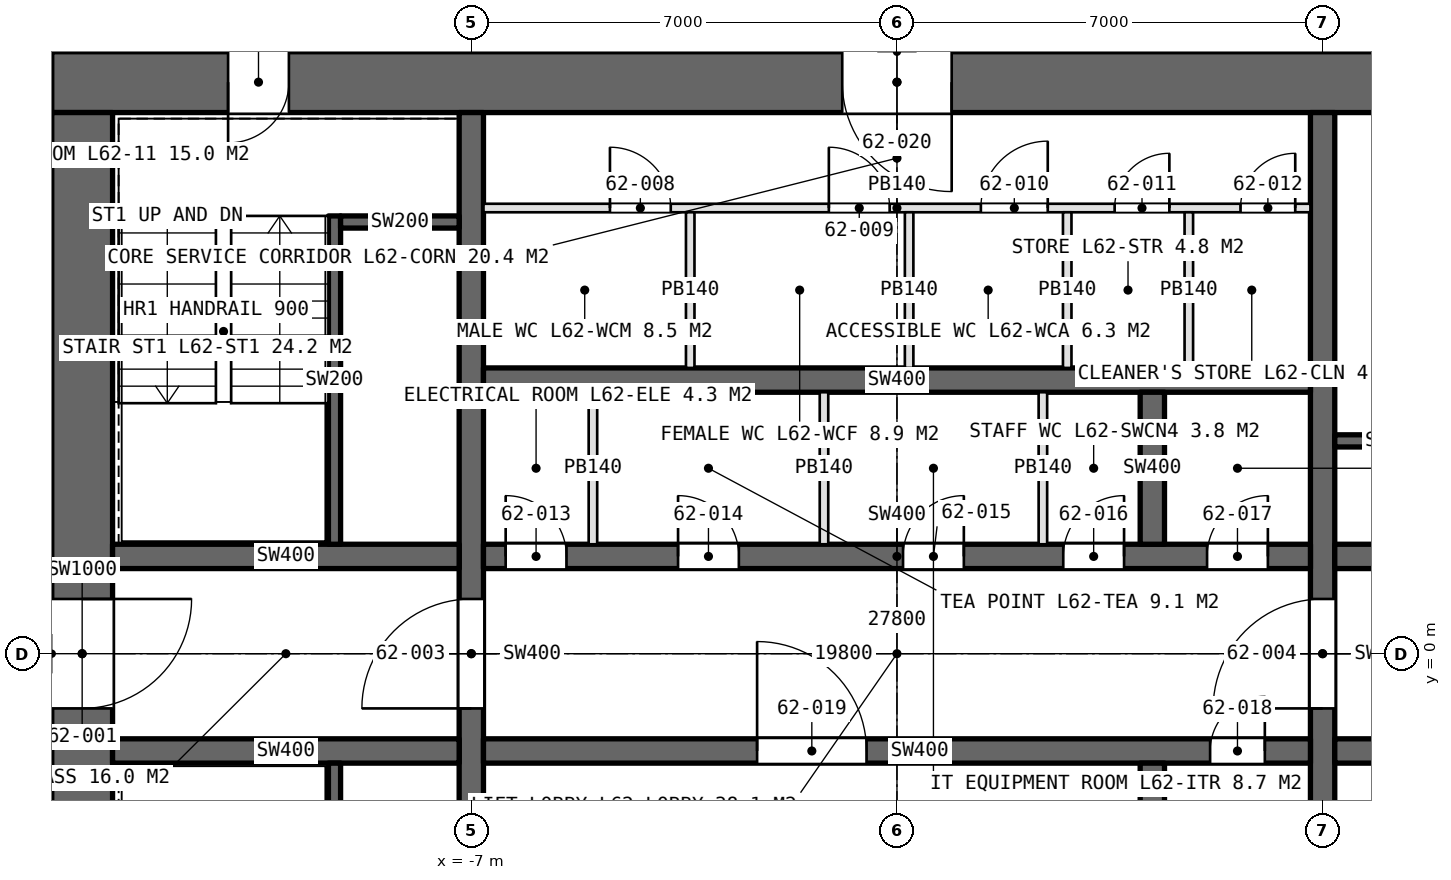
"""IFC4 building model, lengths in metres.
Left out: names, types, materials, properties, quantities, classifications, styles, units other than length and angle.
Written with IfcOpenShell. Run it as: python <this file> out.ifc"""

import sys

from ifc_helpers import new_model, si_unit, direction, frame, frame_2d, origin, place, context, subcontext, project, spatial, rectangle, extrude, element, fill, save


model = new_model("IFC4")
c1 = context("Model", 3, precision=1e-05, world=origin(), true_north=direction((0.0, 1.0)))
c2 = subcontext(c1, "Body", "Model", "MODEL_VIEW")
j1 = project(units=[si_unit("LENGTHUNIT", "METRE"), si_unit("PLANEANGLEUNIT", "RADIAN")], contexts=[c1])
p1 = place(None, origin())
s1 = spatial("IfcSite", under=j1, at=p1, CompositionType="ELEMENT")
p2 = place(p1, origin())
s2 = spatial("IfcBuilding", under=s1, at=p2, CompositionType="ELEMENT")
p3 = place(p2, frame((0.0, 0.0, 279.6)))
s3 = spatial("IfcBuildingStorey", under=s2, at=p3, CompositionType="ELEMENT", Elevation=279.6)
p4 = place(p3, frame((13.9, 9.4, 0.0), z_axis=(0.0, 0.0, 1.0), x_axis=(-1.0, 0.0, 0.0)))
e1 = element("IfcWall", 1, at=p4, inside=s3, PredefinedType="SHEAR", context=c2, shape_type="SweptSolid", body=[
    extrude(rectangle(XDim=27.8, YDim=1.0, at=frame_2d((13.9, 0.0))), origin(), (0.0, 0.0, 1.0), 4.2),
])
p5 = place(p4, frame((23.9, 0.0, 0.0)))
e2 = element("IfcOpeningElement", 2, at=p5, cuts=e1, PredefinedType="OPENING", context=c2, shape_type="SweptSolid", body=[
    extrude(rectangle(XDim=1.0, YDim=2.4, at=frame_2d((0.5, 1.2))), frame((0.0, 0.51, 0.0), z_axis=(0.0, -1.0, 0.0), x_axis=(1.0, 0.0, 0.0)), (0.0, 0.0, 1.0), 1.02),
])
p6 = place(p4, frame((13.0, 0.0, 0.0)))
e3 = element("IfcOpeningElement", 3, at=p6, cuts=e1, PredefinedType="OPENING", context=c2, shape_type="SweptSolid", body=[
    extrude(rectangle(XDim=1.8, YDim=2.4, at=frame_2d((0.9, 1.2))), frame((0.0, 0.51, 0.0), z_axis=(0.0, -1.0, 0.0), x_axis=(1.0, 0.0, 0.0)), (0.0, 0.0, 1.0), 1.02),
])
p7 = place(p3, frame((-13.4, 8.9, 0.0), z_axis=(0.0, 0.0, 1.0), x_axis=(0.0, -1.0, 0.0)))
e4 = element("IfcWall", 4, at=p7, inside=s3, PredefinedType="SHEAR", context=c2, shape_type="SweptSolid", body=[
    extrude(rectangle(XDim=17.8, YDim=1.0, at=frame_2d((8.9, 0.0))), origin(), (0.0, 0.0, 1.0), 4.2),
])
p8 = place(p7, frame((8.0, 0.0, 0.0)))
e5 = element("IfcOpeningElement", 5, at=p8, cuts=e4, PredefinedType="OPENING", context=c2, shape_type="SweptSolid", body=[
    extrude(rectangle(XDim=1.8, YDim=2.4, at=frame_2d((0.9, 1.2))), frame((0.0, 0.51, 0.0), z_axis=(0.0, -1.0, 0.0), x_axis=(1.0, 0.0, 0.0)), (0.0, 0.0, 1.0), 1.02),
])
p9 = place(p7, frame((16.6, 0.0, 0.0)))
e6 = element("IfcOpeningElement", 6, at=p9, cuts=e4, PredefinedType="OPENING", context=c2, shape_type="SweptSolid", body=[
    extrude(rectangle(XDim=1.0, YDim=2.4, at=frame_2d((0.5, 1.2))), frame((0.0, 0.51, 0.0), z_axis=(0.0, -1.0, 0.0), x_axis=(1.0, 0.0, 0.0)), (0.0, 0.0, 1.0), 1.02),
])
p10 = place(p3, frame((-7.0, -8.9, 0.0), z_axis=(0.0, 0.0, 1.0), x_axis=(0.0, 1.0, 0.0)))
e7 = element("IfcWall", 7, at=p10, inside=s3, PredefinedType="SHEAR", context=c2, shape_type="SweptSolid", body=[
    extrude(rectangle(XDim=17.8, YDim=0.4, at=frame_2d((8.9, 0.0))), origin(), (0.0, 0.0, 1.0), 4.2),
])
p11 = place(p10, frame((8.0, 0.0, 0.0)))
e8 = element("IfcOpeningElement", 8, at=p11, cuts=e7, PredefinedType="OPENING", context=c2, shape_type="SweptSolid", body=[
    extrude(rectangle(XDim=1.8, YDim=2.4, at=frame_2d((0.9, 1.2))), frame((0.0, 0.21, 0.0), z_axis=(0.0, -1.0, 0.0), x_axis=(1.0, 0.0, 0.0)), (0.0, 0.0, 1.0), 0.42),
])
p12 = place(p3, frame((7.0, -8.9, 0.0), z_axis=(0.0, 0.0, 1.0), x_axis=(0.0, 1.0, 0.0)))
e9 = element("IfcWall", 9, at=p12, inside=s3, PredefinedType="SHEAR", context=c2, shape_type="SweptSolid", body=[
    extrude(rectangle(XDim=17.8, YDim=0.4, at=frame_2d((8.9, 0.0))), origin(), (0.0, 0.0, 1.0), 4.2),
])
p13 = place(p12, frame((8.0, 0.0, 0.0)))
e10 = element("IfcOpeningElement", 10, at=p13, cuts=e9, PredefinedType="OPENING", context=c2, shape_type="SweptSolid", body=[
    extrude(rectangle(XDim=1.8, YDim=2.4, at=frame_2d((0.9, 1.2))), frame((0.0, 0.21, 0.0), z_axis=(0.0, -1.0, 0.0), x_axis=(1.0, 0.0, 0.0)), (0.0, 0.0, 1.0), 0.42),
])
p14 = place(p3, frame((-6.8, 1.6, 0.0), z_axis=(0.0, 0.0, 1.0), x_axis=(1.0, 0.0, 0.0)))
e11 = element("IfcWall", 11, at=p14, inside=s3, PredefinedType="SHEAR", context=c2, shape_type="SweptSolid", body=[
    extrude(rectangle(XDim=13.6, YDim=0.4, at=frame_2d((6.8, 0.0))), origin(), (0.0, 0.0, 1.0), 4.2),
])
p15 = place(p14, frame((0.365, 0.0, 0.0)))
e12 = element("IfcOpeningElement", 12, at=p15, cuts=e11, PredefinedType="OPENING", context=c2, shape_type="SweptSolid", body=[
    extrude(rectangle(XDim=1.0, YDim=2.4, at=frame_2d((0.5, 1.2))), frame((0.0, 0.21, 0.0), z_axis=(0.0, -1.0, 0.0), x_axis=(1.0, 0.0, 0.0)), (0.0, 0.0, 1.0), 0.42),
])
p16 = place(p14, frame((3.2, 0.0, 0.0)))
e13 = element("IfcOpeningElement", 13, at=p16, cuts=e11, PredefinedType="OPENING", context=c2, shape_type="SweptSolid", body=[
    extrude(rectangle(XDim=1.0, YDim=2.4, at=frame_2d((0.5, 1.2))), frame((0.0, 0.21, 0.0), z_axis=(0.0, -1.0, 0.0), x_axis=(1.0, 0.0, 0.0)), (0.0, 0.0, 1.0), 0.42),
])
p17 = place(p14, frame((6.9, 0.0, 0.0)))
e14 = element("IfcOpeningElement", 14, at=p17, cuts=e11, PredefinedType="OPENING", context=c2, shape_type="SweptSolid", body=[
    extrude(rectangle(XDim=1.0, YDim=2.4, at=frame_2d((0.5, 1.2))), frame((0.0, 0.21, 0.0), z_axis=(0.0, -1.0, 0.0), x_axis=(1.0, 0.0, 0.0)), (0.0, 0.0, 1.0), 0.42),
])
p18 = place(p14, frame((9.535, 0.0, 0.0)))
e15 = element("IfcOpeningElement", 15, at=p18, cuts=e11, PredefinedType="OPENING", context=c2, shape_type="SweptSolid", body=[
    extrude(rectangle(XDim=1.0, YDim=2.4, at=frame_2d((0.5, 1.2))), frame((0.0, 0.21, 0.0), z_axis=(0.0, -1.0, 0.0), x_axis=(1.0, 0.0, 0.0)), (0.0, 0.0, 1.0), 0.42),
])
p19 = place(p14, frame((11.9, 0.0, 0.0)))
e16 = element("IfcOpeningElement", 16, at=p19, cuts=e11, PredefinedType="OPENING", context=c2, shape_type="SweptSolid", body=[
    extrude(rectangle(XDim=1.0, YDim=2.4, at=frame_2d((0.5, 1.2))), frame((0.0, 0.21, 0.0), z_axis=(0.0, -1.0, 0.0), x_axis=(1.0, 0.0, 0.0)), (0.0, 0.0, 1.0), 0.42),
])
p20 = place(p3, frame((-6.8, -1.6, 0.0), z_axis=(0.0, 0.0, 1.0), x_axis=(1.0, 0.0, 0.0)))
e17 = element("IfcWall", 17, at=p20, inside=s3, PredefinedType="SHEAR", context=c2, shape_type="SweptSolid", body=[
    extrude(rectangle(XDim=13.6, YDim=0.4, at=frame_2d((6.8, 0.0))), origin(), (0.0, 0.0, 1.0), 4.2),
])
p21 = place(p20, frame((11.95, 0.0, 0.0)))
e18 = element("IfcOpeningElement", 18, at=p21, cuts=e17, PredefinedType="OPENING", context=c2, shape_type="SweptSolid", body=[
    extrude(rectangle(XDim=0.9, YDim=2.4, at=frame_2d((0.45, 1.2))), frame((0.0, 0.21, 0.0), z_axis=(0.0, -1.0, 0.0), x_axis=(1.0, 0.0, 0.0)), (0.0, 0.0, 1.0), 0.42),
])
p22 = place(p20, frame((4.5, 0.0, 0.0)))
e19 = element("IfcOpeningElement", 19, at=p22, cuts=e17, PredefinedType="OPENING", context=c2, shape_type="SweptSolid", body=[
    extrude(rectangle(XDim=1.8, YDim=2.4, at=frame_2d((0.9, 1.2))), frame((0.0, 0.21, 0.0), z_axis=(0.0, -1.0, 0.0), x_axis=(1.0, 0.0, 0.0)), (0.0, 0.0, 1.0), 0.42),
])
p23 = place(p3, frame((-6.8, 4.5, 0.0), z_axis=(0.0, 0.0, 1.0), x_axis=(1.0, 0.0, 0.0)))
e20 = element("IfcWall", 20, at=p23, inside=s3, PredefinedType="SHEAR", context=c2, shape_type="SweptSolid", body=[
    extrude(rectangle(XDim=13.6, YDim=0.4, at=frame_2d((6.8, 0.0))), origin(), (0.0, 0.0, 1.0), 4.2),
])
for number, where, z_axis, x_axis in (
    (21, (-12.9, 1.6, 0.0), (0.0, 0.0, 1.0), (1.0, 0.0, 0.0)),
    (22, (-12.9, -1.6, 0.0), (0.0, 0.0, 1.0), (1.0, 0.0, 0.0)),
):
    element("IfcWall", number, at=place(p3, frame(where, z_axis=z_axis, x_axis=x_axis)), inside=s3, PredefinedType="SHEAR", context=c2, shape_type="SweptSolid", body=[
        extrude(rectangle(XDim=5.7, YDim=0.4, at=frame_2d((2.85, 0.0))), origin(), (0.0, 0.0, 1.0), 4.2),
    ])
p24 = place(p3, frame((7.2, 1.6, 0.0), z_axis=(0.0, 0.0, 1.0), x_axis=(1.0, 0.0, 0.0)))
e23 = element("IfcWall", 23, at=p24, inside=s3, PredefinedType="SHEAR", context=c2, shape_type="SweptSolid", body=[
    extrude(rectangle(XDim=5.7, YDim=0.4, at=frame_2d((2.85, 0.0))), origin(), (0.0, 0.0, 1.0), 4.2),
])
p25 = place(p24, frame((0.7, 0.0, 0.0)))
e24 = element("IfcOpeningElement", 24, at=p25, cuts=e23, PredefinedType="OPENING", context=c2, shape_type="SweptSolid", body=[
    extrude(rectangle(XDim=1.0, YDim=2.4, at=frame_2d((0.5, 1.2))), frame((0.0, 0.21, 0.0), z_axis=(0.0, -1.0, 0.0), x_axis=(1.0, 0.0, 0.0)), (0.0, 0.0, 1.0), 0.42),
])
p26 = place(p3, frame((7.2, -1.6, 0.0), z_axis=(0.0, 0.0, 1.0), x_axis=(1.0, 0.0, 0.0)))
e25 = element("IfcWall", 25, at=p26, inside=s3, PredefinedType="SHEAR", context=c2, shape_type="SweptSolid", body=[
    extrude(rectangle(XDim=5.7, YDim=0.4, at=frame_2d((2.85, 0.0))), origin(), (0.0, 0.0, 1.0), 4.2),
])
p27 = place(p26, frame((0.9, 0.0, 0.0)))
e26 = element("IfcOpeningElement", 26, at=p27, cuts=e25, PredefinedType="OPENING", context=c2, shape_type="SweptSolid", body=[
    extrude(rectangle(XDim=1.3, YDim=2.4, at=frame_2d((0.65, 1.2))), frame((0.0, 0.21, 0.0), z_axis=(0.0, -1.0, 0.0), x_axis=(1.0, 0.0, 0.0)), (0.0, 0.0, 1.0), 0.42),
])
p28 = place(p26, frame((3.95, 0.0, 0.0)))
e27 = element("IfcOpeningElement", 27, at=p28, cuts=e25, PredefinedType="OPENING", context=c2, shape_type="SweptSolid", body=[
    extrude(rectangle(XDim=1.3, YDim=2.4, at=frame_2d((0.65, 1.2))), frame((0.0, 0.21, 0.0), z_axis=(0.0, -1.0, 0.0), x_axis=(1.0, 0.0, 0.0)), (0.0, 0.0, 1.0), 0.42),
])
for number, where, z_axis, x_axis in (
    (28, (4.2, 1.8, 0.0), (0.0, 0.0, 1.0), (0.0, 1.0, 0.0)),
    (29, (4.2, -4.3, 0.0), (0.0, 0.0, 1.0), (0.0, 1.0, 0.0)),
):
    element("IfcWall", number, at=place(p3, frame(where, z_axis=z_axis, x_axis=x_axis)), inside=s3, PredefinedType="SHEAR", context=c2, shape_type="SweptSolid", body=[
        extrude(rectangle(XDim=2.5, YDim=0.4, at=frame_2d((1.25, 0.0))), origin(), (0.0, 0.0, 1.0), 4.2),
    ])
p29 = place(p3, frame((-6.8, 7.33, 0.0), z_axis=(0.0, 0.0, 1.0), x_axis=(1.0, 0.0, 0.0)))
e30 = element("IfcWall", 30, at=p29, inside=s3, PredefinedType="PARTITIONING", context=c2, shape_type="SweptSolid", body=[
    extrude(rectangle(XDim=13.6, YDim=0.14, at=frame_2d((6.8, 0.0))), origin(), (0.0, 0.0, 1.0), 3.95),
])
p30 = place(p29, frame((2.08, 0.0, 0.0)))
e31 = element("IfcOpeningElement", 31, at=p30, cuts=e30, PredefinedType="OPENING", context=c2, shape_type="SweptSolid", body=[
    extrude(rectangle(XDim=1.0, YDim=2.4, at=frame_2d((0.5, 1.2))), frame((0.0, 0.08, 0.0), z_axis=(0.0, -1.0, 0.0), x_axis=(1.0, 0.0, 0.0)), (0.0, 0.0, 1.0), 0.16),
])
p31 = place(p29, frame((5.68, 0.0, 0.0)))
e32 = element("IfcOpeningElement", 32, at=p31, cuts=e30, PredefinedType="OPENING", context=c2, shape_type="SweptSolid", body=[
    extrude(rectangle(XDim=1.0, YDim=2.4, at=frame_2d((0.5, 1.2))), frame((0.0, 0.08, 0.0), z_axis=(0.0, -1.0, 0.0), x_axis=(1.0, 0.0, 0.0)), (0.0, 0.0, 1.0), 0.16),
])
p32 = place(p29, frame((8.18, 0.0, 0.0)))
e33 = element("IfcOpeningElement", 33, at=p32, cuts=e30, PredefinedType="OPENING", context=c2, shape_type="SweptSolid", body=[
    extrude(rectangle(XDim=1.1, YDim=2.4, at=frame_2d((0.55, 1.2))), frame((0.0, 0.08, 0.0), z_axis=(0.0, -1.0, 0.0), x_axis=(1.0, 0.0, 0.0)), (0.0, 0.0, 1.0), 0.16),
])
p33 = place(p29, frame((10.38, 0.0, 0.0)))
e34 = element("IfcOpeningElement", 34, at=p33, cuts=e30, PredefinedType="OPENING", context=c2, shape_type="SweptSolid", body=[
    extrude(rectangle(XDim=0.9, YDim=2.4, at=frame_2d((0.45, 1.2))), frame((0.0, 0.08, 0.0), z_axis=(0.0, -1.0, 0.0), x_axis=(1.0, 0.0, 0.0)), (0.0, 0.0, 1.0), 0.16),
])
p34 = place(p29, frame((12.45, 0.0, 0.0)))
e35 = element("IfcOpeningElement", 35, at=p34, cuts=e30, PredefinedType="OPENING", context=c2, shape_type="SweptSolid", body=[
    extrude(rectangle(XDim=0.9, YDim=2.4, at=frame_2d((0.45, 1.2))), frame((0.0, 0.08, 0.0), z_axis=(0.0, -1.0, 0.0), x_axis=(1.0, 0.0, 0.0)), (0.0, 0.0, 1.0), 0.16),
])
for number, where, z_axis, x_axis in (
    (36, (-3.4, 4.7, 0.0), (0.0, 0.0, 1.0), (0.0, 1.0, 0.0)),
    (37, (0.2, 4.7, 0.0), (0.0, 0.0, 1.0), (0.0, 1.0, 0.0)),
    (38, (2.8, 4.7, 0.0), (0.0, 0.0, 1.0), (0.0, 1.0, 0.0)),
    (39, (4.8, 4.7, 0.0), (0.0, 0.0, 1.0), (0.0, 1.0, 0.0)),
):
    element("IfcWall", number, at=place(p3, frame(where, z_axis=z_axis, x_axis=x_axis)), inside=s3, PredefinedType="PARTITIONING", context=c2, shape_type="SweptSolid", body=[
        extrude(rectangle(XDim=2.56, YDim=0.14, at=frame_2d((1.28, 0.0))), origin(), (0.0, 0.0, 1.0), 3.95),
    ])
for number, where, z_axis, x_axis in (
    (40, (-5.0, 1.8, 0.0), (0.0, 0.0, 1.0), (0.0, 1.0, 0.0)),
    (41, (-1.2, 1.8, 0.0), (0.0, 0.0, 1.0), (0.0, 1.0, 0.0)),
    (42, (2.4, 1.8, 0.0), (0.0, 0.0, 1.0), (0.0, 1.0, 0.0)),
):
    element("IfcWall", number, at=place(p3, frame(where, z_axis=z_axis, x_axis=x_axis)), inside=s3, PredefinedType="PARTITIONING", context=c2, shape_type="SweptSolid", body=[
        extrude(rectangle(XDim=2.5, YDim=0.14, at=frame_2d((1.25, 0.0))), origin(), (0.0, 0.0, 1.0), 3.95),
    ])
p35 = place(p3, frame((-9.25, 7.2, 0.0), z_axis=(0.0, 0.0, 1.0), x_axis=(0.0, -1.0, 0.0)))
e43 = element("IfcWall", 43, at=p35, inside=s3, PredefinedType="SOLIDWALL", context=c2, shape_type="SweptSolid", body=[
    extrude(rectangle(XDim=5.4, YDim=0.2, at=frame_2d((2.7, 0.0))), origin(), (0.0, 0.0, 1.0), 4.2),
])
p36 = place(p3, frame((-9.15, 7.1, 0.0), z_axis=(0.0, 0.0, 1.0), x_axis=(1.0, 0.0, 0.0)))
e44 = element("IfcWall", 44, at=p36, inside=s3, PredefinedType="SOLIDWALL", context=c2, shape_type="SweptSolid", body=[
    extrude(rectangle(XDim=1.95, YDim=0.2, at=frame_2d((0.975, 0.0))), origin(), (0.0, 0.0, 1.0), 4.2),
])
p37 = place(p3, frame((-9.25, -7.2, 0.0), z_axis=(0.0, 0.0, 1.0), x_axis=(0.0, 1.0, 0.0)))
e45 = element("IfcWall", 45, at=p37, inside=s3, PredefinedType="SOLIDWALL", context=c2, shape_type="SweptSolid", body=[
    extrude(rectangle(XDim=5.4, YDim=0.2, at=frame_2d((2.7, 0.0))), origin(), (0.0, 0.0, 1.0), 4.2),
])
p38 = place(p3, frame((9.15, 3.5, 0.0), z_axis=(0.0, 0.0, 1.0), x_axis=(-1.0, 0.0, 0.0)))
e46 = element("IfcWall", 46, at=p38, inside=s3, PredefinedType="SOLIDWALL", context=c2, shape_type="SweptSolid", body=[
    extrude(rectangle(XDim=1.95, YDim=0.2, at=frame_2d((0.975, 0.0))), origin(), (0.0, 0.0, 1.0), 4.2),
])
p39 = place(p8, origin())
e47 = element("IfcDoor", 47, at=p39, inside=s3, OperationType="DOUBLE_DOOR_SINGLE_SWING", PredefinedType="DOOR", context=c2, shape_type="SweptSolid", body=[
    extrude(rectangle(XDim=1.8, YDim=2.4, at=frame_2d((0.9, 1.2))), frame((0.0, 0.025, 0.0), z_axis=(0.0, -1.0, 0.0), x_axis=(1.0, 0.0, 0.0)), (0.0, 0.0, 1.0), 0.05),
])
fill(e5, e47)
p40 = place(p11, origin())
e48 = element("IfcDoor", 48, at=p40, inside=s3, OperationType="DOUBLE_DOOR_SINGLE_SWING", PredefinedType="DOOR", context=c2, shape_type="SweptSolid", body=[
    extrude(rectangle(XDim=1.8, YDim=2.4, at=frame_2d((0.9, 1.2))), frame((0.0, 0.025, 0.0), z_axis=(0.0, -1.0, 0.0), x_axis=(1.0, 0.0, 0.0)), (0.0, 0.0, 1.0), 0.05),
])
fill(e8, e48)
p41 = place(p13, origin())
e49 = element("IfcDoor", 49, at=p41, inside=s3, OperationType="DOUBLE_DOOR_SINGLE_SWING", PredefinedType="DOOR", context=c2, shape_type="SweptSolid", body=[
    extrude(rectangle(XDim=1.8, YDim=2.4, at=frame_2d((0.9, 1.2))), frame((0.0, 0.025, 0.0), z_axis=(0.0, -1.0, 0.0), x_axis=(1.0, 0.0, 0.0)), (0.0, 0.0, 1.0), 0.05),
])
fill(e10, e49)
p42 = place(p5, origin())
e50 = element("IfcDoor", 50, at=p42, inside=s3, OperationType="SINGLE_SWING_RIGHT", PredefinedType="DOOR", context=c2, shape_type="SweptSolid", body=[
    extrude(rectangle(XDim=1.0, YDim=2.4, at=frame_2d((0.5, 1.2))), frame((0.0, 0.025, 0.0), z_axis=(0.0, -1.0, 0.0), x_axis=(1.0, 0.0, 0.0)), (0.0, 0.0, 1.0), 0.05),
])
fill(e2, e50)
p43 = place(p30, origin())
e51 = element("IfcDoor", 51, at=p43, inside=s3, OperationType="SINGLE_SWING_LEFT", PredefinedType="DOOR", context=c2, shape_type="SweptSolid", body=[
    extrude(rectangle(XDim=1.0, YDim=2.4, at=frame_2d((0.5, 1.2))), frame((0.0, 0.025, 0.0), z_axis=(0.0, -1.0, 0.0), x_axis=(1.0, 0.0, 0.0)), (0.0, 0.0, 1.0), 0.05),
])
fill(e31, e51)
p44 = place(p31, origin())
e52 = element("IfcDoor", 52, at=p44, inside=s3, OperationType="SINGLE_SWING_LEFT", PredefinedType="DOOR", context=c2, shape_type="SweptSolid", body=[
    extrude(rectangle(XDim=1.0, YDim=2.4, at=frame_2d((0.5, 1.2))), frame((0.0, 0.025, 0.0), z_axis=(0.0, -1.0, 0.0), x_axis=(1.0, 0.0, 0.0)), (0.0, 0.0, 1.0), 0.05),
])
fill(e32, e52)
p45 = place(p32, origin())
e53 = element("IfcDoor", 53, at=p45, inside=s3, OperationType="SINGLE_SWING_RIGHT", PredefinedType="DOOR", context=c2, shape_type="SweptSolid", body=[
    extrude(rectangle(XDim=1.1, YDim=2.4, at=frame_2d((0.55, 1.2))), frame((0.0, 0.025, 0.0), z_axis=(0.0, -1.0, 0.0), x_axis=(1.0, 0.0, 0.0)), (0.0, 0.0, 1.0), 0.05),
])
fill(e33, e53)
p46 = place(p33, origin())
e54 = element("IfcDoor", 54, at=p46, inside=s3, OperationType="SINGLE_SWING_RIGHT", PredefinedType="DOOR", context=c2, shape_type="SweptSolid", body=[
    extrude(rectangle(XDim=0.9, YDim=2.4, at=frame_2d((0.45, 1.2))), frame((0.0, 0.025, 0.0), z_axis=(0.0, -1.0, 0.0), x_axis=(1.0, 0.0, 0.0)), (0.0, 0.0, 1.0), 0.05),
])
fill(e34, e54)
p47 = place(p34, origin())
e55 = element("IfcDoor", 55, at=p47, inside=s3, OperationType="SINGLE_SWING_RIGHT", PredefinedType="DOOR", context=c2, shape_type="SweptSolid", body=[
    extrude(rectangle(XDim=0.9, YDim=2.4, at=frame_2d((0.45, 1.2))), frame((0.0, 0.025, 0.0), z_axis=(0.0, -1.0, 0.0), x_axis=(1.0, 0.0, 0.0)), (0.0, 0.0, 1.0), 0.05),
])
fill(e35, e55)
p48 = place(p15, origin())
e56 = element("IfcDoor", 56, at=p48, inside=s3, OperationType="SINGLE_SWING_LEFT", PredefinedType="DOOR", context=c2, shape_type="SweptSolid", body=[
    extrude(rectangle(XDim=1.0, YDim=2.4, at=frame_2d((0.5, 1.2))), frame((0.0, 0.025, 0.0), z_axis=(0.0, -1.0, 0.0), x_axis=(1.0, 0.0, 0.0)), (0.0, 0.0, 1.0), 0.05),
])
fill(e12, e56)
p49 = place(p16, origin())
e57 = element("IfcDoor", 57, at=p49, inside=s3, OperationType="SINGLE_SWING_LEFT", PredefinedType="DOOR", context=c2, shape_type="SweptSolid", body=[
    extrude(rectangle(XDim=1.0, YDim=2.4, at=frame_2d((0.5, 1.2))), frame((0.0, 0.025, 0.0), z_axis=(0.0, -1.0, 0.0), x_axis=(1.0, 0.0, 0.0)), (0.0, 0.0, 1.0), 0.05),
])
fill(e13, e57)
p50 = place(p17, origin())
e58 = element("IfcDoor", 58, at=p50, inside=s3, OperationType="SINGLE_SWING_RIGHT", PredefinedType="DOOR", context=c2, shape_type="SweptSolid", body=[
    extrude(rectangle(XDim=1.0, YDim=2.4, at=frame_2d((0.5, 1.2))), frame((0.0, 0.025, 0.0), z_axis=(0.0, -1.0, 0.0), x_axis=(1.0, 0.0, 0.0)), (0.0, 0.0, 1.0), 0.05),
])
fill(e14, e58)
p51 = place(p18, origin())
e59 = element("IfcDoor", 59, at=p51, inside=s3, OperationType="SINGLE_SWING_RIGHT", PredefinedType="DOOR", context=c2, shape_type="SweptSolid", body=[
    extrude(rectangle(XDim=1.0, YDim=2.4, at=frame_2d((0.5, 1.2))), frame((0.0, 0.025, 0.0), z_axis=(0.0, -1.0, 0.0), x_axis=(1.0, 0.0, 0.0)), (0.0, 0.0, 1.0), 0.05),
])
fill(e15, e59)
p52 = place(p19, origin())
e60 = element("IfcDoor", 60, at=p52, inside=s3, OperationType="SINGLE_SWING_RIGHT", PredefinedType="DOOR", context=c2, shape_type="SweptSolid", body=[
    extrude(rectangle(XDim=1.0, YDim=2.4, at=frame_2d((0.5, 1.2))), frame((0.0, 0.025, 0.0), z_axis=(0.0, -1.0, 0.0), x_axis=(1.0, 0.0, 0.0)), (0.0, 0.0, 1.0), 0.05),
])
fill(e16, e60)
p53 = place(p21, origin())
e61 = element("IfcDoor", 61, at=p53, inside=s3, OperationType="SINGLE_SWING_RIGHT", PredefinedType="DOOR", context=c2, shape_type="SweptSolid", body=[
    extrude(rectangle(XDim=0.9, YDim=2.4, at=frame_2d((0.45, 1.2))), frame((0.0, 0.025, 0.0), z_axis=(0.0, -1.0, 0.0), x_axis=(1.0, 0.0, 0.0)), (0.0, 0.0, 1.0), 0.05),
])
fill(e18, e61)
p54 = place(p22, origin())
e62 = element("IfcDoor", 62, at=p54, inside=s3, OperationType="DOUBLE_DOOR_SINGLE_SWING", PredefinedType="DOOR", context=c2, shape_type="SweptSolid", body=[
    extrude(rectangle(XDim=1.8, YDim=2.4, at=frame_2d((0.9, 1.2))), frame((0.0, 0.025, 0.0), z_axis=(0.0, -1.0, 0.0), x_axis=(1.0, 0.0, 0.0)), (0.0, 0.0, 1.0), 0.05),
])
fill(e19, e62)
p55 = place(p6, origin())
e63 = element("IfcDoor", 63, at=p55, inside=s3, OperationType="DOUBLE_DOOR_SINGLE_SWING", PredefinedType="DOOR", context=c2, shape_type="SweptSolid", body=[
    extrude(rectangle(XDim=1.8, YDim=2.4, at=frame_2d((0.9, 1.2))), frame((0.0, 0.025, 0.0), z_axis=(0.0, -1.0, 0.0), x_axis=(1.0, 0.0, 0.0)), (0.0, 0.0, 1.0), 0.05),
])
fill(e3, e63)
save(model, sys.argv[1])
